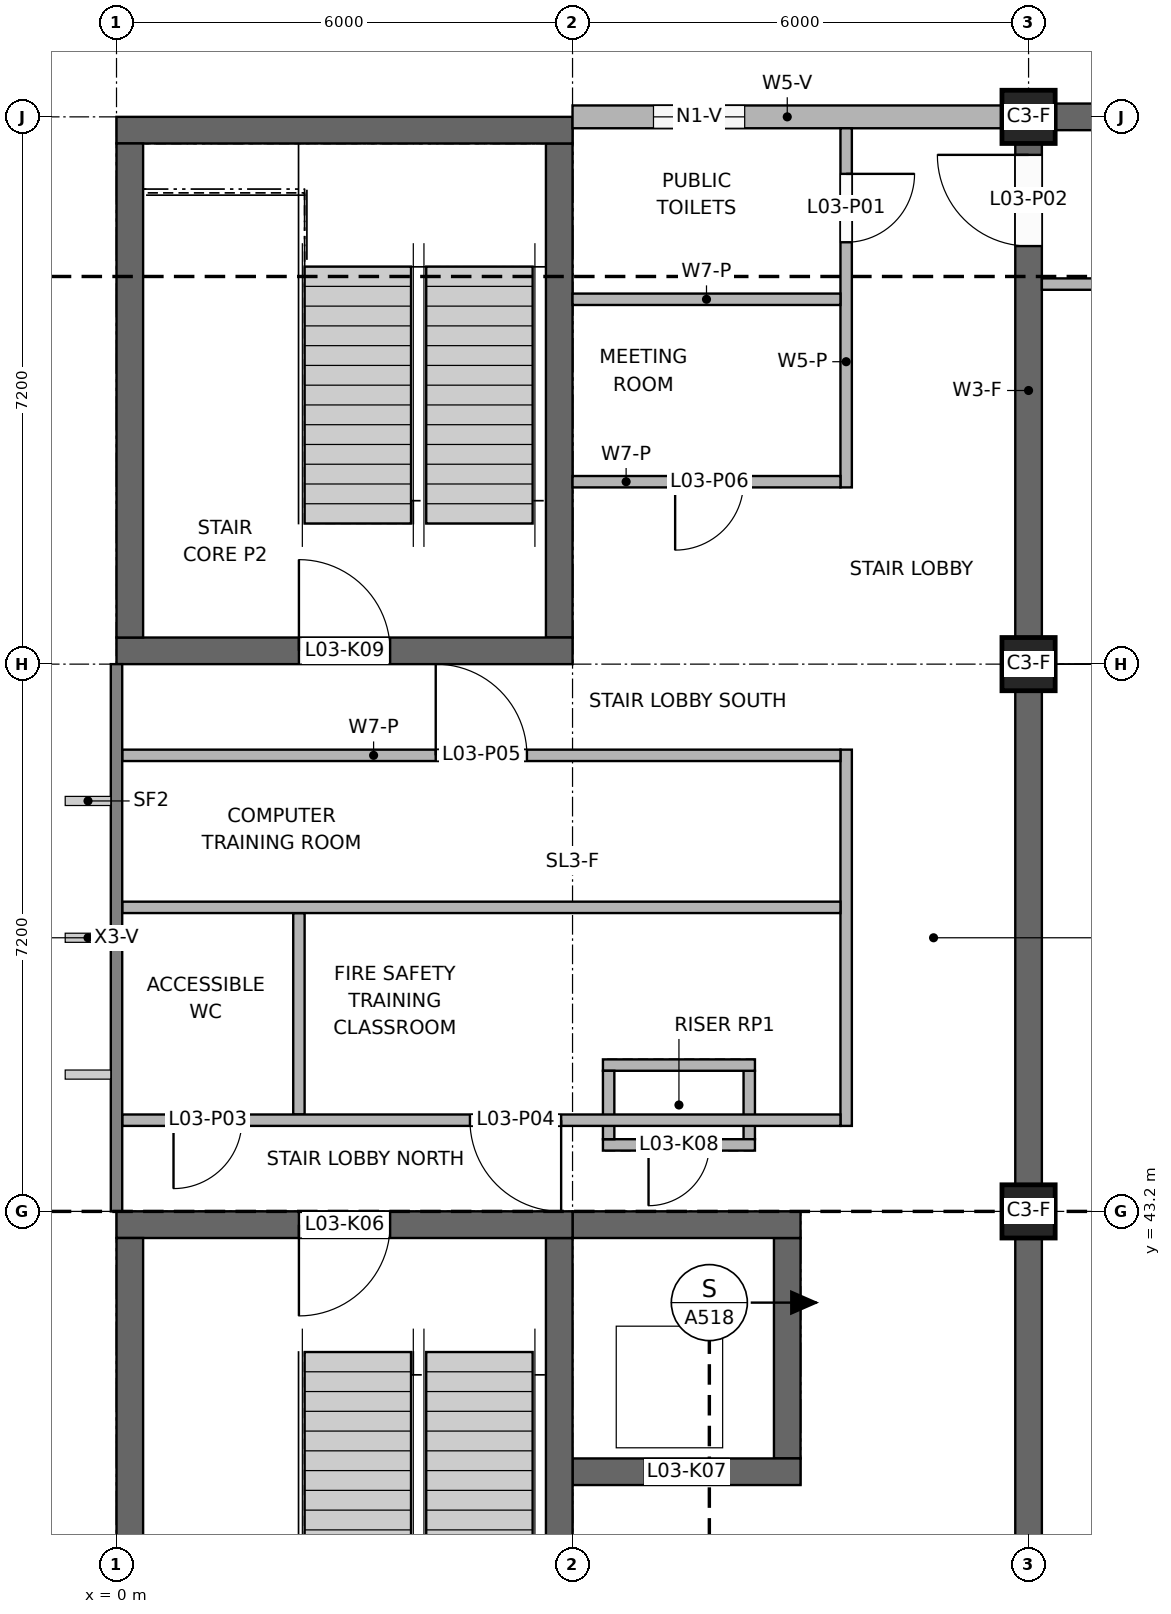
"""IFC4 building model, lengths in metres.
Left out: names, types, materials, properties, quantities, classifications, styles, units other than length and angle.
Written with IfcOpenShell. Run it as: python <this file> out.ifc"""

import sys

from ifc_helpers import new_model, si_unit, direction, frame, frame_2d, origin, origin_2d, place, context, subcontext, project, spatial, rectangle, extrude, element, fill, save


model = new_model("IFC4")
c1 = context("Model", 3, precision=1e-05, world=origin(), true_north=direction((0.0, 1.0)))
c2 = subcontext(c1, "Body", "Model", "MODEL_VIEW")
j1 = project(units=[si_unit("LENGTHUNIT", "METRE"), si_unit("PLANEANGLEUNIT", "RADIAN")], contexts=[c1])
p1 = place(None, origin())
s1 = spatial("IfcSite", under=j1, at=p1, CompositionType="ELEMENT")
p2 = place(p1, origin())
s2 = spatial("IfcBuilding", under=s1, at=p2, CompositionType="ELEMENT")
p3 = place(p2, frame((0.0, 0.0, 12.6)))
s3 = spatial("IfcBuildingStorey", under=s2, at=p3, CompositionType="ELEMENT", Elevation=12.6)
p4 = place(p3, frame((0.0, 43.025, 0.0), z_axis=(0.0, 0.0, 1.0), x_axis=(1.0, 0.0, 0.0)))
e1 = element("IfcWall", 1, at=p4, inside=s3, PredefinedType="SHEAR", context=c2, shape_type="SweptSolid", body=[
    extrude(rectangle(XDim=6.0, YDim=0.35, at=frame_2d((3.0, 0.0))), origin(), (0.0, 0.0, 1.0), 4.0),
])
p5 = place(p4, frame((2.4, 0.0, 0.0)))
e2 = element("IfcOpeningElement", 2, at=p5, cuts=e1, PredefinedType="OPENING", context=c2, shape_type="SweptSolid", body=[
    extrude(rectangle(XDim=1.2, YDim=2.1, at=frame_2d((0.6, 1.05))), frame((0.0, 0.185, 0.0), z_axis=(0.0, -1.0, 0.0), x_axis=(1.0, 0.0, 0.0)), (0.0, 0.0, 1.0), 0.37),
])
for number, where, z_axis, x_axis in (
    (3, (0.175, 36.35, 0.0), (0.0, 0.0, 1.0), (0.0, 1.0, 0.0)),
    (4, (5.825, 36.35, 0.0), (0.0, 0.0, 1.0), (0.0, 1.0, 0.0)),
):
    element("IfcWall", number, at=place(p3, frame(where, z_axis=z_axis, x_axis=x_axis)), inside=s3, PredefinedType="SHEAR", context=c2, shape_type="SweptSolid", body=[
        extrude(rectangle(XDim=6.5, YDim=0.35, at=frame_2d((3.25, 0.0))), origin(), (0.0, 0.0, 1.0), 4.0),
    ])
p6 = place(p3, frame((6.0, 39.775, 0.0), z_axis=(0.0, 0.0, 1.0), x_axis=(1.0, 0.0, 0.0)))
e5 = element("IfcWall", 5, at=p6, inside=s3, PredefinedType="SHEAR", context=c2, shape_type="SweptSolid", body=[
    extrude(rectangle(XDim=3.0, YDim=0.35, at=frame_2d((1.5, 0.0))), origin(), (0.0, 0.0, 1.0), 4.2),
])
p7 = place(p6, frame((0.95, 0.0, 0.0)))
e6 = element("IfcOpeningElement", 6, at=p7, cuts=e5, PredefinedType="OPENING", context=c2, shape_type="SweptSolid", body=[
    extrude(rectangle(XDim=1.1, YDim=2.1, at=frame_2d((0.55, 1.05))), frame((0.0, 0.185, 0.0), z_axis=(0.0, -1.0, 0.0), x_axis=(1.0, 0.0, 0.0)), (0.0, 0.0, 1.0), 0.37),
])
p8 = place(p3, frame((6.0, 43.025, 0.0), z_axis=(0.0, 0.0, 1.0), x_axis=(1.0, 0.0, 0.0)))
e7 = element("IfcWall", 7, at=p8, inside=s3, PredefinedType="SHEAR", context=c2, shape_type="SweptSolid", body=[
    extrude(rectangle(XDim=3.0, YDim=0.35, at=frame_2d((1.5, 0.0))), origin(), (0.0, 0.0, 1.0), 4.2),
])
p9 = place(p3, frame((8.825, 39.95, 0.0), z_axis=(0.0, 0.0, 1.0), x_axis=(0.0, 1.0, 0.0)))
e8 = element("IfcWall", 8, at=p9, inside=s3, PredefinedType="SHEAR", context=c2, shape_type="SweptSolid", body=[
    extrude(rectangle(XDim=2.9, YDim=0.35, at=frame_2d((1.45, 0.0))), origin(), (0.0, 0.0, 1.0), 4.2),
])
p10 = place(p3, frame((0.0, 50.575, 0.0), z_axis=(0.0, 0.0, 1.0), x_axis=(1.0, 0.0, 0.0)))
e9 = element("IfcWall", 9, at=p10, inside=s3, PredefinedType="SHEAR", context=c2, shape_type="SweptSolid", body=[
    extrude(rectangle(XDim=6.0, YDim=0.35, at=frame_2d((3.0, 0.0))), origin(), (0.0, 0.0, 1.0), 4.0),
])
p11 = place(p10, frame((2.4, 0.0, 0.0)))
e10 = element("IfcOpeningElement", 10, at=p11, cuts=e9, PredefinedType="OPENING", context=c2, shape_type="SweptSolid", body=[
    extrude(rectangle(XDim=1.2, YDim=2.1, at=frame_2d((0.6, 1.05))), frame((0.0, 0.185, 0.0), z_axis=(0.0, -1.0, 0.0), x_axis=(1.0, 0.0, 0.0)), (0.0, 0.0, 1.0), 0.37),
])
p12 = place(p3, frame((0.0, 57.425, 0.0), z_axis=(0.0, 0.0, 1.0), x_axis=(1.0, 0.0, 0.0)))
e11 = element("IfcWall", 11, at=p12, inside=s3, PredefinedType="SHEAR", context=c2, shape_type="SweptSolid", body=[
    extrude(rectangle(XDim=6.0, YDim=0.35, at=frame_2d((3.0, 0.0))), origin(), (0.0, 0.0, 1.0), 4.0),
])
for number, where, z_axis, x_axis in (
    (12, (0.175, 50.75, 0.0), (0.0, 0.0, 1.0), (0.0, 1.0, 0.0)),
    (13, (5.825, 50.75, 0.0), (0.0, 0.0, 1.0), (0.0, 1.0, 0.0)),
):
    element("IfcWall", number, at=place(p3, frame(where, z_axis=z_axis, x_axis=x_axis)), inside=s3, PredefinedType="SHEAR", context=c2, shape_type="SweptSolid", body=[
        extrude(rectangle(XDim=6.5, YDim=0.35, at=frame_2d((3.25, 0.0))), origin(), (0.0, 0.0, 1.0), 4.0),
    ])
p13 = place(p3, frame((6.4, 44.075, 0.0), z_axis=(0.0, 0.0, 1.0), x_axis=(1.0, 0.0, 0.0)))
e14 = element("IfcWall", 14, at=p13, inside=s3, PredefinedType="SOLIDWALL", context=c2, shape_type="SweptSolid", body=[
    extrude(rectangle(XDim=2.0, YDim=0.15, at=frame_2d((1.0, 0.0))), origin(), (0.0, 0.0, 1.0), 4.2),
])
p14 = place(p13, frame((0.6, 0.0, 0.0)))
e15 = element("IfcOpeningElement", 15, at=p14, cuts=e14, PredefinedType="OPENING", context=c2, shape_type="SweptSolid", body=[
    extrude(rectangle(XDim=0.8, YDim=2.1, at=frame_2d((0.4, 1.05))), frame((0.0, 0.085, 0.0), z_axis=(0.0, -1.0, 0.0), x_axis=(1.0, 0.0, 0.0)), (0.0, 0.0, 1.0), 0.17),
])
p15 = place(p3, frame((6.4, 45.125, 0.0), z_axis=(0.0, 0.0, 1.0), x_axis=(1.0, 0.0, 0.0)))
e16 = element("IfcWall", 16, at=p15, inside=s3, PredefinedType="SOLIDWALL", context=c2, shape_type="SweptSolid", body=[
    extrude(rectangle(XDim=2.0, YDim=0.15, at=frame_2d((1.0, 0.0))), origin(), (0.0, 0.0, 1.0), 4.2),
])
for number, where, z_axis, x_axis in (
    (17, (6.475, 44.15, 0.0), (0.0, 0.0, 1.0), (0.0, 1.0, 0.0)),
    (18, (8.325, 44.15, 0.0), (0.0, 0.0, 1.0), (0.0, 1.0, 0.0)),
):
    element("IfcWall", number, at=place(p3, frame(where, z_axis=z_axis, x_axis=x_axis)), inside=s3, PredefinedType="SOLIDWALL", context=c2, shape_type="SweptSolid", body=[
        extrude(rectangle(XDim=0.9, YDim=0.15, at=frame_2d((0.45, 0.0))), origin(), (0.0, 0.0, 1.0), 4.2),
    ])
for number, where, z_axis, x_axis in (
    (19, (12.0, 43.2, 0.0), (0.0, 0.0, 1.0), (1.0, 0.0, 0.0)),
    (20, (12.0, 50.4, 0.0), (0.0, 0.0, 1.0), (1.0, 0.0, 0.0)),
    (21, (12.0, 57.6, 0.0), (0.0, 0.0, 1.0), (1.0, 0.0, 0.0)),
):
    element("IfcColumn", number, at=place(p3, frame(where, z_axis=z_axis, x_axis=x_axis)), inside=s3, PredefinedType="COLUMN", context=c2, shape_type="SweptSolid", body=[
        extrude(rectangle(XDim=0.7, YDim=0.7, at=origin_2d()), origin(), (0.0, 0.0, 1.0), 4.0),
    ])
for number, where, z_axis, x_axis in (
    (22, (12.0, 36.35, 0.0), (0.0, 0.0, 1.0), (0.0, 1.0, 0.0)),
    (23, (12.0, 43.55, 0.0), (0.0, 0.0, 1.0), (0.0, 1.0, 0.0)),
):
    element("IfcWall", number, at=place(p3, frame(where, z_axis=z_axis, x_axis=x_axis)), inside=s3, PredefinedType="SHEAR", context=c2, shape_type="SweptSolid", body=[
        extrude(rectangle(XDim=6.5, YDim=0.35, at=frame_2d((3.25, 0.0))), origin(), (0.0, 0.0, 1.0), 3.1),
    ])
p16 = place(p3, frame((12.0, 50.75, 0.0), z_axis=(0.0, 0.0, 1.0), x_axis=(0.0, 1.0, 0.0)))
e24 = element("IfcWall", 24, at=p16, inside=s3, PredefinedType="SHEAR", context=c2, shape_type="SweptSolid", body=[
    extrude(rectangle(XDim=6.5, YDim=0.35, at=frame_2d((3.25, 0.0))), origin(), (0.0, 0.0, 1.0), 3.1),
])
p17 = place(p16, frame((5.15, 0.0, 0.0)))
e25 = element("IfcOpeningElement", 25, at=p17, cuts=e24, PredefinedType="OPENING", context=c2, shape_type="SweptSolid", body=[
    extrude(rectangle(XDim=1.2, YDim=2.1, at=frame_2d((0.6, 1.05))), frame((0.0, 0.185, 0.0), z_axis=(0.0, -1.0, 0.0), x_axis=(1.0, 0.0, 0.0)), (0.0, 0.0, 1.0), 0.37),
])
p18 = place(p3, frame((12.35, 57.6, 0.0), z_axis=(0.0, 0.0, 1.0), x_axis=(1.0, 0.0, 0.0)))
e26 = element("IfcWall", 26, at=p18, inside=s3, PredefinedType="SHEAR", context=c2, shape_type="SweptSolid", body=[
    extrude(rectangle(XDim=17.475, YDim=0.35, at=frame_2d((8.737, 0.0))), origin(), (0.0, 0.0, 1.0), 3.158),
])
p19 = place(p3, frame((6.0, 57.6, 0.0), z_axis=(0.0, 0.0, 1.0), x_axis=(1.0, 0.0, 0.0)))
e27 = element("IfcWall", 27, at=p19, inside=s3, PredefinedType="SOLIDWALL", context=c2, shape_type="SweptSolid", body=[
    extrude(rectangle(XDim=5.65, YDim=0.3, at=frame_2d((2.825, 0.0))), origin(), (0.0, 0.0, 1.0), 3.2),
])
p20 = place(p19, frame((1.065, 0.0, 0.9)))
e28 = element("IfcOpeningElement", 28, at=p20, cuts=e27, PredefinedType="OPENING", context=c2, shape_type="SweptSolid", body=[
    extrude(rectangle(XDim=1.2, YDim=1.5, at=frame_2d((0.6, 0.75))), frame((0.0, 0.16, 0.0), z_axis=(0.0, -1.0, 0.0), x_axis=(1.0, 0.0, 0.0)), (0.0, 0.0, 1.0), 0.32),
])
p21 = place(p3, frame((2.4, 44.475, 0.0), z_axis=(0.0, 0.0, 1.0), x_axis=(0.0, 1.0, 0.0)))
e29 = element("IfcWall", 29, at=p21, inside=s3, PredefinedType="PARTITIONING", context=c2, shape_type="SweptSolid", body=[
    extrude(rectangle(XDim=2.65, YDim=0.15, at=frame_2d((1.325, 0.0))), origin(), (0.0, 0.0, 1.0), 4.0),
])
p22 = place(p3, frame((9.6, 44.325, 0.0), z_axis=(0.0, 0.0, 1.0), x_axis=(0.0, 1.0, 0.0)))
e30 = element("IfcWall", 30, at=p22, inside=s3, PredefinedType="PARTITIONING", context=c2, shape_type="SweptSolid", body=[
    extrude(rectangle(XDim=4.95, YDim=0.15, at=frame_2d((2.475, 0.0))), origin(), (0.0, 0.0, 1.0), 4.0),
])
p23 = place(p3, frame((9.6, 52.725, 0.0), z_axis=(0.0, 0.0, 1.0), x_axis=(0.0, 1.0, 0.0)))
e31 = element("IfcWall", 31, at=p23, inside=s3, PredefinedType="PARTITIONING", context=c2, shape_type="SweptSolid", body=[
    extrude(rectangle(XDim=4.725, YDim=0.15, at=frame_2d((2.362, 0.0))), origin(), (0.0, 0.0, 1.0), 3.2),
])
p24 = place(p23, frame((3.225, 0.0, 0.0)))
e32 = element("IfcOpeningElement", 32, at=p24, cuts=e31, PredefinedType="OPENING", context=c2, shape_type="SweptSolid", body=[
    extrude(rectangle(XDim=0.9, YDim=2.1, at=frame_2d((0.45, 1.05))), frame((0.0, 0.085, 0.0), z_axis=(0.0, -1.0, 0.0), x_axis=(1.0, 0.0, 0.0)), (0.0, 0.0, 1.0), 0.17),
])
p25 = place(p3, frame((0.075, 44.4, 0.0), z_axis=(0.0, 0.0, 1.0), x_axis=(1.0, 0.0, 0.0)))
e33 = element("IfcWall", 33, at=p25, inside=s3, PredefinedType="PARTITIONING", context=c2, shape_type="SweptSolid", body=[
    extrude(rectangle(XDim=9.45, YDim=0.15, at=frame_2d((4.725, 0.0))), origin(), (0.0, 0.0, 1.0), 4.0),
])
p26 = place(p25, frame((0.675, 0.0, 0.0)))
e34 = element("IfcOpeningElement", 34, at=p26, cuts=e33, PredefinedType="OPENING", context=c2, shape_type="SweptSolid", body=[
    extrude(rectangle(XDim=0.9, YDim=2.1, at=frame_2d((0.45, 1.05))), frame((0.0, 0.085, 0.0), z_axis=(0.0, -1.0, 0.0), x_axis=(1.0, 0.0, 0.0)), (0.0, 0.0, 1.0), 0.17),
])
p27 = place(p25, frame((4.575, 0.0, 0.0)))
e35 = element("IfcOpeningElement", 35, at=p27, cuts=e33, PredefinedType="OPENING", context=c2, shape_type="SweptSolid", body=[
    extrude(rectangle(XDim=1.2, YDim=2.1, at=frame_2d((0.6, 1.05))), frame((0.0, 0.085, 0.0), z_axis=(0.0, -1.0, 0.0), x_axis=(1.0, 0.0, 0.0)), (0.0, 0.0, 1.0), 0.17),
])
p28 = place(p3, frame((0.075, 47.2, 0.0), z_axis=(0.0, 0.0, 1.0), x_axis=(1.0, 0.0, 0.0)))
e36 = element("IfcWall", 36, at=p28, inside=s3, PredefinedType="PARTITIONING", context=c2, shape_type="SweptSolid", body=[
    extrude(rectangle(XDim=9.45, YDim=0.15, at=frame_2d((4.725, 0.0))), origin(), (0.0, 0.0, 1.0), 4.0),
])
p29 = place(p3, frame((0.075, 49.2, 0.0), z_axis=(0.0, 0.0, 1.0), x_axis=(1.0, 0.0, 0.0)))
e37 = element("IfcWall", 37, at=p29, inside=s3, PredefinedType="PARTITIONING", context=c2, shape_type="SweptSolid", body=[
    extrude(rectangle(XDim=9.45, YDim=0.15, at=frame_2d((4.725, 0.0))), origin(), (0.0, 0.0, 1.0), 4.0),
])
p30 = place(p29, frame((4.125, 0.0, 0.0)))
e38 = element("IfcOpeningElement", 38, at=p30, cuts=e37, PredefinedType="OPENING", context=c2, shape_type="SweptSolid", body=[
    extrude(rectangle(XDim=1.2, YDim=2.1, at=frame_2d((0.6, 1.05))), frame((0.0, 0.085, 0.0), z_axis=(0.0, -1.0, 0.0), x_axis=(1.0, 0.0, 0.0)), (0.0, 0.0, 1.0), 0.17),
])
p31 = place(p3, frame((6.0, 52.8, 0.0), z_axis=(0.0, 0.0, 1.0), x_axis=(1.0, 0.0, 0.0)))
e39 = element("IfcWall", 39, at=p31, inside=s3, PredefinedType="PARTITIONING", context=c2, shape_type="SweptSolid", body=[
    extrude(rectangle(XDim=3.525, YDim=0.15, at=frame_2d((1.762, 0.0))), origin(), (0.0, 0.0, 1.0), 4.0),
])
p32 = place(p31, frame((1.35, 0.0, 0.0)))
e40 = element("IfcOpeningElement", 40, at=p32, cuts=e39, PredefinedType="OPENING", context=c2, shape_type="SweptSolid", body=[
    extrude(rectangle(XDim=0.9, YDim=2.1, at=frame_2d((0.45, 1.05))), frame((0.0, 0.085, 0.0), z_axis=(0.0, -1.0, 0.0), x_axis=(1.0, 0.0, 0.0)), (0.0, 0.0, 1.0), 0.17),
])
p33 = place(p3, frame((6.0, 55.2, 0.0), z_axis=(0.0, 0.0, 1.0), x_axis=(1.0, 0.0, 0.0)))
e41 = element("IfcWall", 41, at=p33, inside=s3, PredefinedType="PARTITIONING", context=c2, shape_type="SweptSolid", body=[
    extrude(rectangle(XDim=3.525, YDim=0.15, at=frame_2d((1.762, 0.0))), origin(), (0.0, 0.0, 1.0), 4.0),
])
p34 = place(p3, frame((12.175, 55.4, 0.0), z_axis=(0.0, 0.0, 1.0), x_axis=(1.0, 0.0, 0.0)))
e42 = element("IfcWall", 42, at=p34, inside=s3, PredefinedType="PARTITIONING", context=c2, shape_type="SweptSolid", body=[
    extrude(rectangle(XDim=12.925, YDim=0.15, at=frame_2d((6.462, 0.0))), origin(), (0.0, 0.0, 1.0), 3.1),
])
p35 = place(p34, frame((5.525, 0.0, 0.0)))
e43 = element("IfcOpeningElement", 43, at=p35, cuts=e42, PredefinedType="OPENING", context=c2, shape_type="SweptSolid", body=[
    extrude(rectangle(XDim=1.8, YDim=2.1, at=frame_2d((0.9, 1.05))), frame((0.0, 0.085, 0.0), z_axis=(0.0, -1.0, 0.0), x_axis=(1.0, 0.0, 0.0)), (0.0, 0.0, 1.0), 0.17),
])
p36 = place(p20, origin())
e44 = element("IfcWindow", 44, at=p36, inside=s3, PartitioningType="SINGLE_PANEL", PredefinedType="WINDOW", context=c2, shape_type="SweptSolid", body=[
    extrude(rectangle(XDim=1.2, YDim=1.5, at=frame_2d((0.6, 0.75))), frame((0.0, 0.03, 0.0), z_axis=(0.0, -1.0, 0.0), x_axis=(1.0, 0.0, 0.0)), (0.0, 0.0, 1.0), 0.06),
])
fill(e28, e44)
p37 = place(p5, frame((1.2, 0.0, 0.0), z_axis=(0.0, 0.0, 1.0), x_axis=(-1.0, 0.0, 0.0)))
e45 = element("IfcDoor", 45, at=p37, inside=s3, OperationType="SINGLE_SWING_RIGHT", PredefinedType="DOOR", context=c2, shape_type="SweptSolid", body=[
    extrude(rectangle(XDim=1.2, YDim=2.1, at=frame_2d((0.6, 1.05))), frame((0.0, 0.025, 0.0), z_axis=(0.0, -1.0, 0.0), x_axis=(1.0, 0.0, 0.0)), (0.0, 0.0, 1.0), 0.05),
])
fill(e2, e45)
p38 = place(p7, origin())
e46 = element("IfcDoor", 46, at=p38, inside=s3, OperationType="DOUBLE_DOOR_SLIDING", PredefinedType="DOOR", context=c2, shape_type="SweptSolid", body=[
    extrude(rectangle(XDim=1.1, YDim=2.1, at=frame_2d((0.55, 1.05))), frame((0.0, 0.025, 0.0), z_axis=(0.0, -1.0, 0.0), x_axis=(1.0, 0.0, 0.0)), (0.0, 0.0, 1.0), 0.05),
])
fill(e6, e46)
p39 = place(p14, frame((0.8, 0.0, 0.0), z_axis=(0.0, 0.0, 1.0), x_axis=(-1.0, 0.0, 0.0)))
e47 = element("IfcDoor", 47, at=p39, inside=s3, OperationType="SINGLE_SWING_RIGHT", PredefinedType="DOOR", context=c2, shape_type="SweptSolid", body=[
    extrude(rectangle(XDim=0.8, YDim=2.1, at=frame_2d((0.4, 1.05))), frame((0.0, 0.025, 0.0), z_axis=(0.0, -1.0, 0.0), x_axis=(1.0, 0.0, 0.0)), (0.0, 0.0, 1.0), 0.05),
])
fill(e15, e47)
p40 = place(p11, origin())
e48 = element("IfcDoor", 48, at=p40, inside=s3, OperationType="SINGLE_SWING_LEFT", PredefinedType="DOOR", context=c2, shape_type="SweptSolid", body=[
    extrude(rectangle(XDim=1.2, YDim=2.1, at=frame_2d((0.6, 1.05))), frame((0.0, 0.025, 0.0), z_axis=(0.0, -1.0, 0.0), x_axis=(1.0, 0.0, 0.0)), (0.0, 0.0, 1.0), 0.05),
])
fill(e10, e48)
p41 = place(p24, frame((0.9, 0.0, 0.0), z_axis=(0.0, 0.0, 1.0), x_axis=(-1.0, 0.0, 0.0)))
e49 = element("IfcDoor", 49, at=p41, inside=s3, OperationType="SINGLE_SWING_LEFT", PredefinedType="DOOR", context=c2, shape_type="SweptSolid", body=[
    extrude(rectangle(XDim=0.9, YDim=2.1, at=frame_2d((0.45, 1.05))), frame((0.0, 0.025, 0.0), z_axis=(0.0, -1.0, 0.0), x_axis=(1.0, 0.0, 0.0)), (0.0, 0.0, 1.0), 0.05),
])
fill(e32, e49)
p42 = place(p17, origin())
e50 = element("IfcDoor", 50, at=p42, inside=s3, OperationType="SINGLE_SWING_RIGHT", PredefinedType="DOOR", context=c2, shape_type="SweptSolid", body=[
    extrude(rectangle(XDim=1.2, YDim=2.1, at=frame_2d((0.6, 1.05))), frame((0.0, 0.025, 0.0), z_axis=(0.0, -1.0, 0.0), x_axis=(1.0, 0.0, 0.0)), (0.0, 0.0, 1.0), 0.05),
])
fill(e25, e50)
p43 = place(p26, frame((0.9, 0.0, 0.0), z_axis=(0.0, 0.0, 1.0), x_axis=(-1.0, 0.0, 0.0)))
e51 = element("IfcDoor", 51, at=p43, inside=s3, OperationType="SINGLE_SWING_RIGHT", PredefinedType="DOOR", context=c2, shape_type="SweptSolid", body=[
    extrude(rectangle(XDim=0.9, YDim=2.1, at=frame_2d((0.45, 1.05))), frame((0.0, 0.025, 0.0), z_axis=(0.0, -1.0, 0.0), x_axis=(1.0, 0.0, 0.0)), (0.0, 0.0, 1.0), 0.05),
])
fill(e34, e51)
p44 = place(p27, frame((1.2, 0.0, 0.0), z_axis=(0.0, 0.0, 1.0), x_axis=(-1.0, 0.0, 0.0)))
e52 = element("IfcDoor", 52, at=p44, inside=s3, OperationType="SINGLE_SWING_LEFT", PredefinedType="DOOR", context=c2, shape_type="SweptSolid", body=[
    extrude(rectangle(XDim=1.2, YDim=2.1, at=frame_2d((0.6, 1.05))), frame((0.0, 0.025, 0.0), z_axis=(0.0, -1.0, 0.0), x_axis=(1.0, 0.0, 0.0)), (0.0, 0.0, 1.0), 0.05),
])
fill(e35, e52)
p45 = place(p30, origin())
e53 = element("IfcDoor", 53, at=p45, inside=s3, OperationType="SINGLE_SWING_LEFT", PredefinedType="DOOR", context=c2, shape_type="SweptSolid", body=[
    extrude(rectangle(XDim=1.2, YDim=2.1, at=frame_2d((0.6, 1.05))), frame((0.0, 0.025, 0.0), z_axis=(0.0, -1.0, 0.0), x_axis=(1.0, 0.0, 0.0)), (0.0, 0.0, 1.0), 0.05),
])
fill(e38, e53)
p46 = place(p32, frame((0.9, 0.0, 0.0), z_axis=(0.0, 0.0, 1.0), x_axis=(-1.0, 0.0, 0.0)))
e54 = element("IfcDoor", 54, at=p46, inside=s3, OperationType="SINGLE_SWING_RIGHT", PredefinedType="DOOR", context=c2, shape_type="SweptSolid", body=[
    extrude(rectangle(XDim=0.9, YDim=2.1, at=frame_2d((0.45, 1.05))), frame((0.0, 0.025, 0.0), z_axis=(0.0, -1.0, 0.0), x_axis=(1.0, 0.0, 0.0)), (0.0, 0.0, 1.0), 0.05),
])
fill(e40, e54)
save(model, sys.argv[1])
